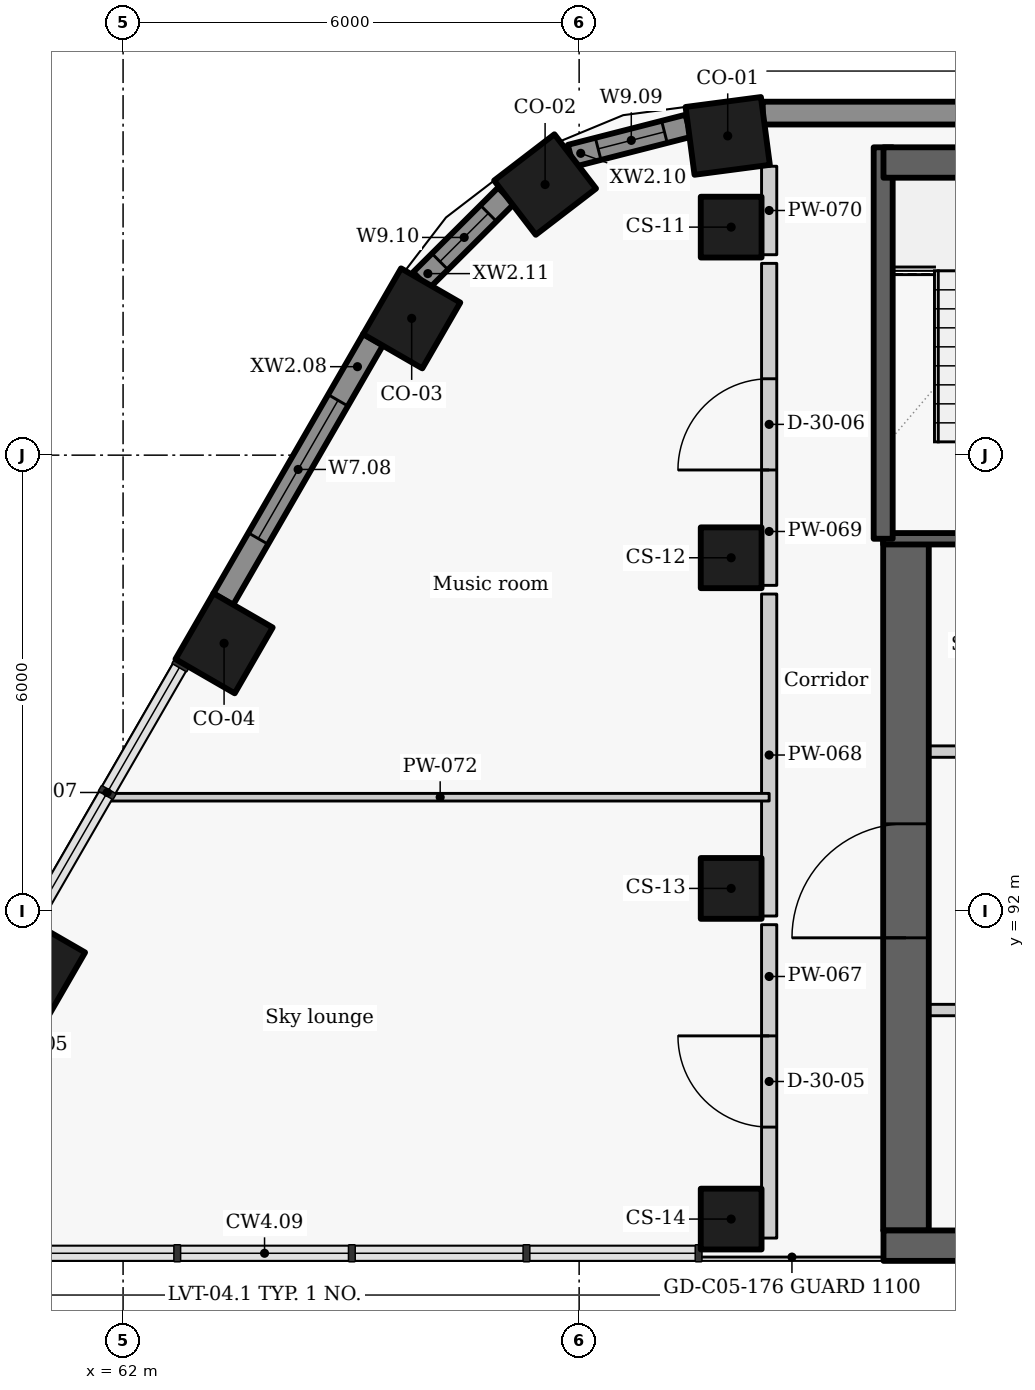
"""IFC4 building model, lengths in metres.
Left out: names, types, materials, properties, quantities, classifications, styles, units other than length and angle.
Written with IfcOpenShell. Run it as: python <this file> out.ifc"""

import sys

from ifc_helpers import new_model, si_unit, direction, frame, frame_2d, origin, origin_2d, place, context, subcontext, project, spatial, rectangle, extrude, element, fill, save


model = new_model("IFC4")
c1 = context("Model", 3, precision=1e-05, world=origin(), true_north=direction((0.0, 1.0)))
c2 = subcontext(c1, "Body", "Model", "MODEL_VIEW")
j1 = project(units=[si_unit("LENGTHUNIT", "METRE"), si_unit("PLANEANGLEUNIT", "RADIAN")], contexts=[c1])
p1 = place(None, origin())
s1 = spatial("IfcSite", under=j1, at=p1, CompositionType="ELEMENT")
p2 = place(p1, origin())
s2 = spatial("IfcBuilding", under=s1, at=p2, CompositionType="ELEMENT")
p3 = place(p2, frame((0.0, 0.0, 286.8)))
s3 = spatial("IfcBuildingStorey", under=s2, at=p3, CompositionType="ELEMENT", Elevation=286.8)
for number, where, z_axis, x_axis in (
    (1, (69.955, 102.2, 0.0), (0.0, 0.0, 1.0), (-0.991, -0.131, 0.0)),
    (2, (67.552, 101.56, 0.0), (0.0, 0.0, 1.0), (-0.793, -0.609, 0.0)),
    (3, (65.797, 99.8, 0.0), (0.0, 0.0, 1.0), (-0.5, -0.866, 0.0)),
    (4, (63.329, 95.525, 0.0), (0.0, 0.0, 1.0), (-0.5, -0.866, 0.0)),
    (5, (60.861, 91.25, 0.0), (0.0, 0.0, 1.0), (-0.5, -0.866, 0.0)),
):
    element("IfcColumn", number, at=place(p3, frame(where, z_axis=z_axis, x_axis=x_axis)), inside=s3, PredefinedType="COLUMN", context=c2, shape_type="SweptSolid", body=[
        extrude(rectangle(XDim=1.0, YDim=0.9, at=origin_2d()), origin(), (0.0, 0.0, 1.0), 3.6),
    ])
for number, where, z_axis, x_axis in (
    (6, (70.0, 101.0, 0.0), (0.0, 0.0, 1.0), (0.0, -1.0, 0.0)),
    (7, (70.0, 96.65, 0.0), (0.0, 0.0, 1.0), (0.0, -1.0, 0.0)),
    (8, (70.0, 92.3, 0.0), (0.0, 0.0, 1.0), (0.0, -1.0, 0.0)),
    (9, (70.0, 87.95, 0.0), (0.0, 0.0, 1.0), (0.0, -1.0, 0.0)),
):
    element("IfcColumn", number, at=place(p3, frame(where, z_axis=z_axis, x_axis=x_axis)), inside=s3, PredefinedType="COLUMN", context=c2, shape_type="SweptSolid", body=[
        extrude(rectangle(XDim=0.8, YDim=0.8, at=origin_2d()), origin(), (0.0, 0.0, 1.0), 3.6),
    ])
p4 = place(p3, frame((65.289, 99.52, 0.0), z_axis=(0.0, 0.0, 1.0), x_axis=(-0.499986771468, -0.866033041146, 0.0)))
e10 = element("IfcWall", 10, at=p4, inside=s3, PredefinedType="SOLIDWALL", context=c2, shape_type="SweptSolid", body=[
    extrude(rectangle(XDim=3.944, YDim=0.3, at=frame_2d((1.972, 0.0))), origin(), (0.0, 0.0, 1.0), 2.725),
])
p5 = place(p4, frame((0.922, 0.0, 0.9)))
e11 = element("IfcOpeningElement", 11, at=p5, cuts=e10, PredefinedType="OPENING", context=c2, shape_type="SweptSolid", body=[
    extrude(rectangle(XDim=2.1, YDim=1.1, at=frame_2d((1.05, 0.55))), frame((0.0, 0.16, 0.0), z_axis=(0.0, -1.0, 0.0), x_axis=(1.0, 0.0, 0.0)), (0.0, 0.0, 1.0), 0.32),
])
p6 = place(p3, frame((89.549, 102.5, 0.0), z_axis=(0.0, 0.0, 1.0), x_axis=(-1.0, 0.0, 0.0)))
e12 = element("IfcWall", 12, at=p6, inside=s3, PredefinedType="SOLIDWALL", context=c2, shape_type="SweptSolid", body=[
    extrude(rectangle(XDim=19.134, YDim=0.3, at=frame_2d((9.567, 0.0))), origin(), (0.0, 0.0, 1.0), 2.725),
])
p7 = place(p3, frame((69.437, 102.333, 0.0), z_axis=(0.0, 0.0, 1.0), x_axis=(-0.968770279168, -0.247959968947, 0.0)))
e13 = element("IfcWall", 13, at=p7, inside=s3, PredefinedType="SOLIDWALL", context=c2, shape_type="SweptSolid", body=[
    extrude(rectangle(XDim=1.598, YDim=0.3, at=frame_2d((0.799, 0.0))), origin(), (0.0, 0.0, 1.0), 2.725),
])
p8 = place(p7, frame((0.325, 0.0, 0.9)))
e14 = element("IfcOpeningElement", 14, at=p8, cuts=e13, PredefinedType="OPENING", context=c2, shape_type="SweptSolid", body=[
    extrude(rectangle(XDim=0.9, YDim=1.1, at=frame_2d((0.45, 0.55))), frame((0.0, 0.16, 0.0), z_axis=(0.0, -1.0, 0.0), x_axis=(1.0, 0.0, 0.0)), (0.0, 0.0, 1.0), 0.32),
])
p9 = place(p3, frame((67.039, 101.414, 0.0), z_axis=(0.0, 0.0, 1.0), x_axis=(-0.708575326337, -0.705635179754, 0.0)))
e15 = element("IfcWall", 15, at=p9, inside=s3, PredefinedType="SOLIDWALL", context=c2, shape_type="SweptSolid", body=[
    extrude(rectangle(XDim=1.578, YDim=0.3, at=frame_2d((0.789, 0.0))), origin(), (0.0, 0.0, 1.0), 2.725),
])
p10 = place(p9, frame((0.328, 0.0, 0.9)))
e16 = element("IfcOpeningElement", 16, at=p10, cuts=e15, PredefinedType="OPENING", context=c2, shape_type="SweptSolid", body=[
    extrude(rectangle(XDim=0.9, YDim=1.1, at=frame_2d((0.45, 0.55))), frame((0.0, 0.16, 0.0), z_axis=(0.0, -1.0, 0.0), x_axis=(1.0, 0.0, 0.0)), (0.0, 0.0, 1.0), 0.32),
])
p11 = place(p3, frame((85.4, 90.7, 0.0), z_axis=(0.0, 0.0, 1.0), x_axis=(-1.0, 0.0, 0.0)))
e17 = element("IfcWall", 17, at=p11, inside=s3, PredefinedType="PARTITIONING", context=c2, shape_type="SweptSolid", body=[
    extrude(rectangle(XDim=13.4, YDim=0.15, at=frame_2d((6.7, 0.0))), origin(), (0.0, 0.0, 1.0), 3.325),
])
p12 = place(p11, frame((11.325, 0.0, 0.0)))
e18 = element("IfcOpeningElement", 18, at=p12, cuts=e17, PredefinedType="OPENING", context=c2, shape_type="SweptSolid", body=[
    extrude(rectangle(XDim=0.9, YDim=2.1, at=frame_2d((0.45, 1.05))), frame((0.0, 0.085, 0.0), z_axis=(0.0, -1.0, 0.0), x_axis=(1.0, 0.0, 0.0)), (0.0, 0.0, 1.0), 0.17),
])
p13 = place(p11, frame((7.65, 0.0, 0.0)))
e19 = element("IfcOpeningElement", 19, at=p13, cuts=e17, PredefinedType="OPENING", context=c2, shape_type="SweptSolid", body=[
    extrude(rectangle(XDim=0.9, YDim=2.1, at=frame_2d((0.45, 1.05))), frame((0.0, 0.085, 0.0), z_axis=(0.0, -1.0, 0.0), x_axis=(1.0, 0.0, 0.0)), (0.0, 0.0, 1.0), 0.17),
])
p14 = place(p11, frame((3.6, 0.0, 0.0)))
e20 = element("IfcOpeningElement", 20, at=p14, cuts=e17, PredefinedType="OPENING", context=c2, shape_type="SweptSolid", body=[
    extrude(rectangle(XDim=0.9, YDim=2.1, at=frame_2d((0.45, 1.05))), frame((0.0, 0.085, 0.0), z_axis=(0.0, -1.0, 0.0), x_axis=(1.0, 0.0, 0.0)), (0.0, 0.0, 1.0), 0.17),
])
p15 = place(p11, frame((0.9, 0.0, 0.0)))
e21 = element("IfcOpeningElement", 21, at=p15, cuts=e17, PredefinedType="OPENING", context=c2, shape_type="SweptSolid", body=[
    extrude(rectangle(XDim=0.9, YDim=2.1, at=frame_2d((0.45, 1.05))), frame((0.0, 0.085, 0.0), z_axis=(0.0, -1.0, 0.0), x_axis=(1.0, 0.0, 0.0)), (0.0, 0.0, 1.0), 0.17),
])
p16 = place(p3, frame((72.3, 87.8, -0.275), z_axis=(0.0, 0.0, 1.0), x_axis=(0.0, 1.0, 0.0)))
e22 = element("IfcWall", 22, at=p16, inside=s3, PredefinedType="SHEAR", context=c2, shape_type="SweptSolid", body=[
    extrude(rectangle(XDim=9.1, YDim=0.6, at=frame_2d((4.55, 0.0))), origin(), (0.0, 0.0, 1.0), 3.6),
])
p17 = place(p16, frame((3.85, 0.0, 0.275)))
e23 = element("IfcOpeningElement", 23, at=p17, cuts=e22, PredefinedType="OPENING", context=c2, shape_type="SweptSolid", body=[
    extrude(rectangle(XDim=1.5, YDim=2.1, at=frame_2d((0.75, 1.05))), frame((0.0, 0.31, 0.0), z_axis=(0.0, -1.0, 0.0), x_axis=(1.0, 0.0, 0.0)), (0.0, 0.0, 1.0), 0.62),
])
p18 = place(p3, frame((72.0, 94.1, 0.0), z_axis=(0.0, 0.0, 1.0), x_axis=(1.0, 0.0, 0.0)))
e24 = element("IfcWall", 24, at=p18, inside=s3, PredefinedType="PARTITIONING", context=c2, shape_type="SweptSolid", body=[
    extrude(rectangle(XDim=10.703, YDim=0.15, at=frame_2d((5.352, 0.0))), origin(), (0.0, 0.0, 1.0), 3.325),
])
p19 = place(p18, frame((1.075, 0.0, 0.0)))
e25 = element("IfcOpeningElement", 25, at=p19, cuts=e24, PredefinedType="OPENING", context=c2, shape_type="SweptSolid", body=[
    extrude(rectangle(XDim=1.1, YDim=2.1, at=frame_2d((0.55, 1.05))), frame((0.0, 0.085, 0.0), z_axis=(0.0, -1.0, 0.0), x_axis=(1.0, 0.0, 0.0)), (0.0, 0.0, 1.0), 0.17),
])
p20 = place(p18, frame((2.825, 0.0, 0.0)))
e26 = element("IfcOpeningElement", 26, at=p20, cuts=e24, PredefinedType="OPENING", context=c2, shape_type="SweptSolid", body=[
    extrude(rectangle(XDim=0.9, YDim=2.1, at=frame_2d((0.45, 1.05))), frame((0.0, 0.085, 0.0), z_axis=(0.0, -1.0, 0.0), x_axis=(1.0, 0.0, 0.0)), (0.0, 0.0, 1.0), 0.17),
])
p21 = place(p18, frame((4.175, 0.0, 0.0)))
e27 = element("IfcOpeningElement", 27, at=p21, cuts=e24, PredefinedType="OPENING", context=c2, shape_type="SweptSolid", body=[
    extrude(rectangle(XDim=0.9, YDim=2.1, at=frame_2d((0.45, 1.05))), frame((0.0, 0.085, 0.0), z_axis=(0.0, -1.0, 0.0), x_axis=(1.0, 0.0, 0.0)), (0.0, 0.0, 1.0), 0.17),
])
p22 = place(p18, frame((6.05, 0.0, 0.0)))
e28 = element("IfcOpeningElement", 28, at=p22, cuts=e24, PredefinedType="OPENING", context=c2, shape_type="SweptSolid", body=[
    extrude(rectangle(XDim=1.2, YDim=2.1, at=frame_2d((0.6, 1.05))), frame((0.0, 0.085, 0.0), z_axis=(0.0, -1.0, 0.0), x_axis=(1.0, 0.0, 0.0)), (0.0, 0.0, 1.0), 0.17),
])
p23 = place(p18, frame((8.9, 0.0, 0.0)))
e29 = element("IfcOpeningElement", 29, at=p23, cuts=e24, PredefinedType="OPENING", context=c2, shape_type="SweptSolid", body=[
    extrude(rectangle(XDim=0.9, YDim=2.1, at=frame_2d((0.45, 1.05))), frame((0.0, 0.085, 0.0), z_axis=(0.0, -1.0, 0.0), x_axis=(1.0, 0.0, 0.0)), (0.0, 0.0, 1.0), 0.17),
])
p24 = place(p3, frame((74.6, 96.9, -0.275), z_axis=(0.0, 0.0, 1.0), x_axis=(-1.0, 0.0, 0.0)))
e30 = element("IfcWall", 30, at=p24, inside=s3, PredefinedType="SHEAR", context=c2, shape_type="SweptSolid", body=[
    extrude(rectangle(XDim=2.6, YDim=0.15, at=frame_2d((1.3, 0.0))), origin(), (0.0, 0.0, 1.0), 3.6),
])
p25 = place(p24, frame((0.37, 0.0, 0.275)))
e31 = element("IfcOpeningElement", 31, at=p25, cuts=e30, PredefinedType="OPENING", context=c2, shape_type="SweptSolid", body=[
    extrude(rectangle(XDim=1.1, YDim=2.1, at=frame_2d((0.55, 1.05))), frame((0.0, 0.085, 0.0), z_axis=(0.0, -1.0, 0.0), x_axis=(1.0, 0.0, 0.0)), (0.0, 0.0, 1.0), 0.17),
])
p26 = place(p3, frame((72.0, 96.9, -0.275), z_axis=(0.0, 0.0, 1.0), x_axis=(0.0, 1.0, 0.0)))
e32 = element("IfcWall", 32, at=p26, inside=s3, PredefinedType="SHEAR", context=c2, shape_type="SweptSolid", body=[
    extrude(rectangle(XDim=5.15, YDim=0.25, at=frame_2d((2.575, 0.0))), origin(), (0.0, 0.0, 1.0), 3.6),
])
p27 = place(p3, frame((70.5, 87.7, 0.0), z_axis=(0.0, 0.0, 1.0), x_axis=(0.0, 1.0, 0.0)))
e33 = element("IfcWall", 33, at=p27, inside=s3, PredefinedType="PARTITIONING", context=c2, shape_type="SweptSolid", body=[
    extrude(rectangle(XDim=4.123, YDim=0.2, at=frame_2d((2.062, 0.0))), origin(), (0.0, 0.0, 1.0), 3.325),
])
p28 = place(p27, frame((1.46, 0.0, 0.0)))
e34 = element("IfcOpeningElement", 34, at=p28, cuts=e33, PredefinedType="OPENING", context=c2, shape_type="SweptSolid", body=[
    extrude(rectangle(XDim=1.2, YDim=2.1, at=frame_2d((0.6, 1.05))), frame((0.0, 0.11, 0.0), z_axis=(0.0, -1.0, 0.0), x_axis=(1.0, 0.0, 0.0)), (0.0, 0.0, 1.0), 0.22),
])
p29 = place(p3, frame((70.5, 91.937, 0.0), z_axis=(0.0, 0.0, 1.0), x_axis=(0.0, 1.0, 0.0)))
e35 = element("IfcWall", 35, at=p29, inside=s3, PredefinedType="PARTITIONING", context=c2, shape_type="SweptSolid", body=[
    extrude(rectangle(XDim=4.236, YDim=0.2, at=frame_2d((2.118, 0.0))), origin(), (0.0, 0.0, 1.0), 3.325),
])
p30 = place(p3, frame((70.5, 96.287, 0.0), z_axis=(0.0, 0.0, 1.0), x_axis=(0.0, 1.0, 0.0)))
e36 = element("IfcWall", 36, at=p30, inside=s3, PredefinedType="PARTITIONING", context=c2, shape_type="SweptSolid", body=[
    extrude(rectangle(XDim=4.236, YDim=0.2, at=frame_2d((2.118, 0.0))), origin(), (0.0, 0.0, 1.0), 3.325),
])
p31 = place(p30, frame((1.518, 0.0, 0.0)))
e37 = element("IfcOpeningElement", 37, at=p31, cuts=e36, PredefinedType="OPENING", context=c2, shape_type="SweptSolid", body=[
    extrude(rectangle(XDim=1.2, YDim=2.1, at=frame_2d((0.6, 1.05))), frame((0.0, 0.11, 0.0), z_axis=(0.0, -1.0, 0.0), x_axis=(1.0, 0.0, 0.0)), (0.0, 0.0, 1.0), 0.22),
])
p32 = place(p3, frame((70.5, 100.637, 0.0), z_axis=(0.0, 0.0, 1.0), x_axis=(0.0, 1.0, 0.0)))
e38 = element("IfcWall", 38, at=p32, inside=s3, PredefinedType="PARTITIONING", context=c2, shape_type="SweptSolid", body=[
    extrude(rectangle(XDim=1.164, YDim=0.2, at=frame_2d((0.582, 0.0))), origin(), (0.0, 0.0, 1.0), 3.325),
])
p33 = place(p3, frame((61.844, 93.5, 0.0), z_axis=(0.0, 0.0, 1.0), x_axis=(1.0, 0.0, 0.0)))
e39 = element("IfcWall", 39, at=p33, inside=s3, PredefinedType="PARTITIONING", context=c2, shape_type="SweptSolid", body=[
    extrude(rectangle(XDim=8.656, YDim=0.1, at=frame_2d((4.328, 0.0))), origin(), (0.0, 0.0, 1.0), 2.705),
])
p34 = place(p3, frame((72.004, 87.6, -0.275), z_axis=(0.0, 0.0, 1.0), x_axis=(1.0, 0.0, 0.0)))
e40 = element("IfcWall", 40, at=p34, inside=s3, PredefinedType="SHEAR", context=c2, shape_type="SweptSolid", body=[
    extrude(rectangle(XDim=13.396, YDim=0.4, at=frame_2d((6.698, 0.0))), origin(), (0.0, 0.0, 1.0), 3.6),
])
p35 = place(p3, frame((72.004, 101.85, -0.275), z_axis=(0.0, 0.0, 1.0), x_axis=(1.0, 0.0, 0.0)))
e41 = element("IfcWall", 41, at=p35, inside=s3, PredefinedType="SHEAR", context=c2, shape_type="SweptSolid", body=[
    extrude(rectangle(XDim=15.992, YDim=0.4, at=frame_2d((7.996, 0.0))), origin(), (0.0, 0.0, 1.0), 3.6),
])
p36 = place(p5, origin())
e42 = element("IfcWindow", 42, at=p36, inside=s3, PartitioningType="SINGLE_PANEL", PredefinedType="WINDOW", context=c2, shape_type="SweptSolid", body=[
    extrude(rectangle(XDim=2.1, YDim=1.1, at=frame_2d((1.05, 0.55))), frame((0.0, 0.03, 0.0), z_axis=(0.0, -1.0, 0.0), x_axis=(1.0, 0.0, 0.0)), (0.0, 0.0, 1.0), 0.06),
])
fill(e11, e42)
p37 = place(p8, origin())
e43 = element("IfcWindow", 43, at=p37, inside=s3, PartitioningType="SINGLE_PANEL", PredefinedType="WINDOW", context=c2, shape_type="SweptSolid", body=[
    extrude(rectangle(XDim=0.9, YDim=1.1, at=frame_2d((0.45, 0.55))), frame((0.0, 0.03, 0.0), z_axis=(0.0, -1.0, 0.0), x_axis=(1.0, 0.0, 0.0)), (0.0, 0.0, 1.0), 0.06),
])
fill(e14, e43)
p38 = place(p10, origin())
e44 = element("IfcWindow", 44, at=p38, inside=s3, PartitioningType="SINGLE_PANEL", PredefinedType="WINDOW", context=c2, shape_type="SweptSolid", body=[
    extrude(rectangle(XDim=0.9, YDim=1.1, at=frame_2d((0.45, 0.55))), frame((0.0, 0.03, 0.0), z_axis=(0.0, -1.0, 0.0), x_axis=(1.0, 0.0, 0.0)), (0.0, 0.0, 1.0), 0.06),
])
fill(e16, e44)
p39 = place(p28, origin())
e45 = element("IfcDoor", 45, at=p39, inside=s3, OperationType="SINGLE_SWING_RIGHT", PredefinedType="DOOR", context=c2, shape_type="SweptSolid", body=[
    extrude(rectangle(XDim=1.2, YDim=2.1, at=frame_2d((0.6, 1.05))), frame((0.0, 0.025, 0.0), z_axis=(0.0, -1.0, 0.0), x_axis=(1.0, 0.0, 0.0)), (0.0, 0.0, 1.0), 0.05),
])
fill(e34, e45)
p40 = place(p31, origin())
e46 = element("IfcDoor", 46, at=p40, inside=s3, OperationType="SINGLE_SWING_LEFT", PredefinedType="DOOR", context=c2, shape_type="SweptSolid", body=[
    extrude(rectangle(XDim=1.2, YDim=2.1, at=frame_2d((0.6, 1.05))), frame((0.0, 0.025, 0.0), z_axis=(0.0, -1.0, 0.0), x_axis=(1.0, 0.0, 0.0)), (0.0, 0.0, 1.0), 0.05),
])
fill(e37, e46)
p41 = place(p17, origin())
e47 = element("IfcDoor", 47, at=p41, inside=s3, OperationType="DOUBLE_DOOR_SINGLE_SWING", PredefinedType="DOOR", context=c2, shape_type="SweptSolid", body=[
    extrude(rectangle(XDim=1.5, YDim=2.1, at=frame_2d((0.75, 1.05))), frame((0.0, 0.025, 0.0), z_axis=(0.0, -1.0, 0.0), x_axis=(1.0, 0.0, 0.0)), (0.0, 0.0, 1.0), 0.05),
])
fill(e23, e47)
save(model, sys.argv[1])
